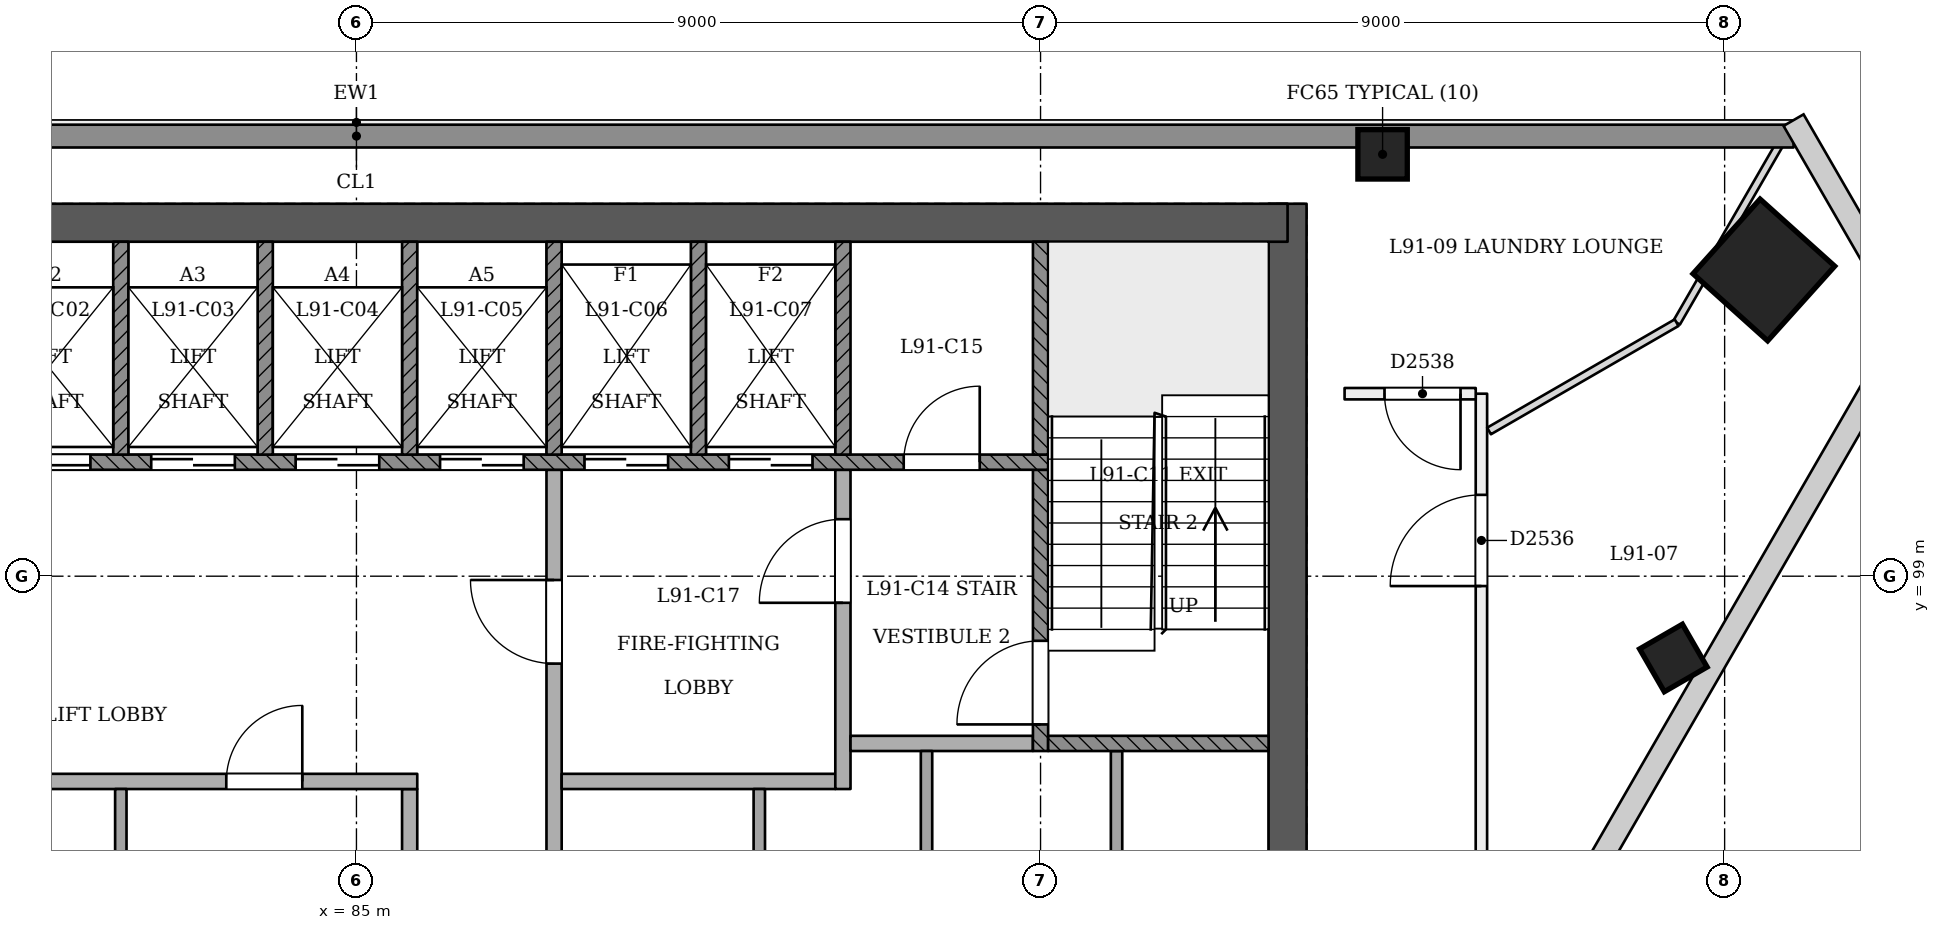
"""IFC4 building model, lengths in metres.
Left out: names, types, materials, properties, quantities, classifications, styles, units other than length and angle.
Written with IfcOpenShell. Run it as: python <this file> out.ifc"""

import sys

from ifc_helpers import new_model, si_unit, direction, frame, frame_2d, origin, origin_2d, place, context, subcontext, project, spatial, rectangle, extrude, element, fill, save


model = new_model("IFC4")
c1 = context("Model", 3, precision=1e-05, world=origin(), true_north=direction((0.0, 1.0)))
c2 = subcontext(c1, "Body", "Model", "MODEL_VIEW")
j1 = project(units=[si_unit("LENGTHUNIT", "METRE"), si_unit("PLANEANGLEUNIT", "RADIAN")], contexts=[c1])
p1 = place(None, origin())
s1 = spatial("IfcSite", under=j1, at=p1, CompositionType="ELEMENT")
p2 = place(p1, origin())
s2 = spatial("IfcBuilding", under=s1, at=p2, CompositionType="ELEMENT")
p3 = place(p2, frame((0.0, 0.0, 350.8)))
s3 = spatial("IfcBuildingStorey", under=s2, at=p3, CompositionType="ELEMENT", Elevation=350.8)
p4 = place(p3, frame((97.25, 93.15, 0.0), z_axis=(0.0, 0.0, 1.0), x_axis=(0.0, 1.0, 0.0)))
e1 = element("IfcWall", 1, at=p4, inside=s3, PredefinedType="SHEAR", context=c2, shape_type="SweptSolid", body=[
    extrude(rectangle(XDim=10.75, YDim=0.5, at=frame_2d((5.375, 0.0))), origin(), (0.0, 0.0, 1.0), 3.6),
])
p5 = place(p3, frame((97.25, 103.65, 0.0), z_axis=(0.0, 0.0, 1.0), x_axis=(-1.0, 0.0, 0.0)))
e2 = element("IfcWall", 2, at=p5, inside=s3, PredefinedType="SHEAR", context=c2, shape_type="SweptSolid", body=[
    extrude(rectangle(XDim=24.75, YDim=0.5, at=frame_2d((12.375, 0.0))), origin(), (0.0, 0.0, 1.0), 3.6),
])
p6 = place(p3, frame((103.55, 103.018, 0.0), z_axis=(-0.028403721265, 0.009287135593, 0.999553389135), x_axis=(0.498891314878, -0.866379500861, 0.022226480336)))
e3 = element("IfcColumn", 3, at=p6, inside=s3, PredefinedType="COLUMN", context=c2, shape_type="SweptSolid", body=[
    extrude(rectangle(XDim=1.32, YDim=1.32, at=origin_2d()), origin(), (0.0, 0.0, 1.0), 3.602),
])
p7 = place(p3, frame((98.5, 104.55, 0.0), z_axis=(0.0, 0.0, 1.0), x_axis=(1.0, 0.0, 0.0)))
e4 = element("IfcColumn", 4, at=p7, inside=s3, PredefinedType="COLUMN", context=c2, shape_type="SweptSolid", body=[
    extrude(rectangle(XDim=0.65, YDim=0.65, at=origin_2d()), origin(), (0.0, 0.0, 1.0), 3.6),
])
p8 = place(p3, frame((102.353, 97.877, -0.02), z_axis=(-0.022153634206, 0.038480930364, 0.999013730882), x_axis=(-0.501312914587, -0.864981193481, 0.022201274571)))
e5 = element("IfcColumn", 5, at=p8, inside=s3, PredefinedType="COLUMN", context=c2, shape_type="SweptSolid", body=[
    extrude(rectangle(XDim=0.65, YDim=0.65, at=origin_2d()), origin(), (0.0, 0.0, 1.0), 3.604),
])
p9 = place(p3, frame((99.8, 92.685, 0.0), z_axis=(0.0, 0.0, 1.0), x_axis=(2.8011989e-05, 0.999999999608, 0.0)))
e6 = element("IfcWall", 6, at=p9, inside=s3, PredefinedType="PARTITIONING", context=c2, shape_type="SweptSolid", body=[
    extrude(rectangle(XDim=8.716, YDim=0.15, at=frame_2d((4.358, 0.0))), origin(), (0.0, 0.0, 1.0), 2.7),
])
p10 = place(p9, frame((6.185, 0.0, 0.0)))
e7 = element("IfcOpeningElement", 7, at=p10, cuts=e6, PredefinedType="OPENING", context=c2, shape_type="SweptSolid", body=[
    extrude(rectangle(XDim=1.2, YDim=2.1, at=frame_2d((0.6, 1.05))), frame((0.0, 0.085, 0.0), z_axis=(0.0, -1.0, 0.0), x_axis=(1.0, 0.0, 0.0)), (0.0, 0.0, 1.0), 0.171),
])
p11 = place(p3, frame((99.725, 101.401, 0.0), z_axis=(0.0, 0.0, 1.0), x_axis=(-1.0, 0.0, 0.0)))
e8 = element("IfcWall", 8, at=p11, inside=s3, PredefinedType="PARTITIONING", context=c2, shape_type="SweptSolid", body=[
    extrude(rectangle(XDim=1.725, YDim=0.15, at=frame_2d((0.863, 0.0))), origin(), (0.0, 0.0, 1.0), 3.2),
])
p12 = place(p11, frame((0.2, 0.0, 0.0)))
e9 = element("IfcOpeningElement", 9, at=p12, cuts=e8, PredefinedType="OPENING", context=c2, shape_type="SweptSolid", body=[
    extrude(rectangle(XDim=1.0, YDim=2.1, at=frame_2d((0.5, 1.05))), frame((0.0, 0.085, 0.0), z_axis=(0.0, -1.0, 0.0), x_axis=(1.0, 0.0, 0.0)), (0.0, 0.0, 1.0), 0.171),
])
p13 = place(p3, frame((103.849, 104.9, 0.0), z_axis=(0.0, 0.0, 1.0), x_axis=(-0.499996007168, -0.866027709035, 0.0)))
e10 = element("IfcWall", 10, at=p13, inside=s3, PredefinedType="PARTITIONING", context=c2, shape_type="SweptSolid", body=[
    extrude(rectangle(XDim=2.961, YDim=0.1, at=frame_2d((1.481, 0.0))), origin(), (0.0, 0.0, 1.0), 2.7),
])
p14 = place(p3, frame((102.368, 102.335, 0.0), z_axis=(0.0, 0.0, 1.0), x_axis=(-0.866041498374, -0.499972122318, 0.0)))
e11 = element("IfcWall", 11, at=p14, inside=s3, PredefinedType="PARTITIONING", context=c2, shape_type="SweptSolid", body=[
    extrude(rectangle(XDim=2.85, YDim=0.1, at=frame_2d((1.425, 0.0))), origin(), (0.0, 0.0, 1.0), 3.2),
])
p15 = place(p3, frame((66.093, 104.79, 0.0), z_axis=(0.0, 0.0, 1.0), x_axis=(1.0, 0.0, 0.0)))
e12 = element("IfcWall", 12, at=p15, inside=s3, PredefinedType="SOLIDWALL", context=c2, shape_type="SweptSolid", body=[
    extrude(rectangle(XDim=37.813, YDim=0.3, at=frame_2d((18.907, 0.0))), origin(), (0.0, 0.0, 1.0), 2.7),
])
p16 = place(p3, frame((81.9, 93.4, 0.0), z_axis=(0.0, 0.0, 1.0), x_axis=(0.0, 1.0, 0.0)))
e13 = element("IfcWall", 13, at=p16, inside=s3, PredefinedType="PARTITIONING", context=c2, shape_type="SweptSolid", body=[
    extrude(rectangle(XDim=2.8, YDim=0.15, at=frame_2d((1.4, 0.0))), origin(), (0.0, 0.0, 1.0), 3.2),
])
p17 = place(p3, frame((85.7, 93.4, 0.0), z_axis=(0.0, 0.0, 1.0), x_axis=(0.0, 1.0, 0.0)))
e14 = element("IfcWall", 14, at=p17, inside=s3, PredefinedType="PARTITIONING", context=c2, shape_type="SweptSolid", body=[
    extrude(rectangle(XDim=2.8, YDim=0.2, at=frame_2d((1.4, 0.0))), origin(), (0.0, 0.0, 1.0), 3.2),
])
p18 = place(p3, frame((87.6, 93.4, 0.0), z_axis=(0.0, 0.0, 1.0), x_axis=(0.0, 1.0, 0.0)))
e15 = element("IfcWall", 15, at=p18, inside=s3, PredefinedType="PARTITIONING", context=c2, shape_type="SweptSolid", body=[
    extrude(rectangle(XDim=7.0, YDim=0.2, at=frame_2d((3.5, 0.0))), origin(), (0.0, 0.0, 1.0), 3.2),
])
p19 = place(p18, frame((4.45, 0.0, 0.0)))
e16 = element("IfcOpeningElement", 16, at=p19, cuts=e15, PredefinedType="OPENING", context=c2, shape_type="SweptSolid", body=[
    extrude(rectangle(XDim=1.1, YDim=2.1, at=frame_2d((0.55, 1.05))), frame((0.0, 0.11, 0.0), z_axis=(0.0, -1.0, 0.0), x_axis=(1.0, 0.0, 0.0)), (0.0, 0.0, 1.0), 0.221),
])
p20 = place(p3, frame((90.3, 93.4, 0.0), z_axis=(0.0, 0.0, 1.0), x_axis=(0.0, 1.0, 0.0)))
e17 = element("IfcWall", 17, at=p20, inside=s3, PredefinedType="PARTITIONING", context=c2, shape_type="SweptSolid", body=[
    extrude(rectangle(XDim=2.8, YDim=0.15, at=frame_2d((1.4, 0.0))), origin(), (0.0, 0.0, 1.0), 3.2),
])
for number, where, z_axis, x_axis in (
    (18, (92.5, 93.4, 0.0), (0.0, 0.0, 1.0), (0.0, 1.0, 0.0)),
    (19, (95.0, 93.4, 0.0), (0.0, 0.0, 1.0), (0.0, 1.0, 0.0)),
):
    element("IfcWall", number, at=place(p3, frame(where, z_axis=z_axis, x_axis=x_axis)), inside=s3, PredefinedType="PARTITIONING", context=c2, shape_type="SweptSolid", body=[
        extrude(rectangle(XDim=3.3, YDim=0.15, at=frame_2d((1.65, 0.0))), origin(), (0.0, 0.0, 1.0), 3.2),
    ])
p21 = place(p3, frame((78.0, 96.3, 0.0), z_axis=(0.0, 0.0, 1.0), x_axis=(1.0, 0.0, 0.0)))
e20 = element("IfcWall", 20, at=p21, inside=s3, PredefinedType="PARTITIONING", context=c2, shape_type="SweptSolid", body=[
    extrude(rectangle(XDim=7.8, YDim=0.2, at=frame_2d((3.9, 0.0))), origin(), (0.0, 0.0, 1.0), 3.2),
])
p22 = place(p21, frame((1.512, 0.0, 0.0)))
e21 = element("IfcOpeningElement", 21, at=p22, cuts=e20, PredefinedType="OPENING", context=c2, shape_type="SweptSolid", body=[
    extrude(rectangle(XDim=1.0, YDim=2.1, at=frame_2d((0.5, 1.05))), frame((0.0, 0.11, 0.0), z_axis=(0.0, -1.0, 0.0), x_axis=(1.0, 0.0, 0.0)), (0.0, 0.0, 1.0), 0.221),
])
p23 = place(p21, frame((5.288, 0.0, 0.0)))
e22 = element("IfcOpeningElement", 22, at=p23, cuts=e20, PredefinedType="OPENING", context=c2, shape_type="SweptSolid", body=[
    extrude(rectangle(XDim=1.0, YDim=2.1, at=frame_2d((0.5, 1.05))), frame((0.0, 0.11, 0.0), z_axis=(0.0, -1.0, 0.0), x_axis=(1.0, 0.0, 0.0)), (0.0, 0.0, 1.0), 0.221),
])
p24 = place(p3, frame((87.7, 96.3, 0.0), z_axis=(0.0, 0.0, 1.0), x_axis=(1.0, 0.0, 0.0)))
e23 = element("IfcWall", 23, at=p24, inside=s3, PredefinedType="PARTITIONING", context=c2, shape_type="SweptSolid", body=[
    extrude(rectangle(XDim=3.6, YDim=0.2, at=frame_2d((1.8, 0.0))), origin(), (0.0, 0.0, 1.0), 3.2),
])
p25 = place(p3, frame((91.4, 96.2, 0.0), z_axis=(0.0, 0.0, 1.0), x_axis=(0.0, 1.0, 0.0)))
e24 = element("IfcWall", 24, at=p25, inside=s3, PredefinedType="PARTITIONING", context=c2, shape_type="SweptSolid", body=[
    extrude(rectangle(XDim=4.2, YDim=0.2, at=frame_2d((2.1, 0.0))), origin(), (0.0, 0.0, 1.0), 3.2),
])
p26 = place(p25, frame((2.45, 0.0, 0.0)))
e25 = element("IfcOpeningElement", 25, at=p26, cuts=e24, PredefinedType="OPENING", context=c2, shape_type="SweptSolid", body=[
    extrude(rectangle(XDim=1.1, YDim=2.1, at=frame_2d((0.55, 1.05))), frame((0.0, 0.11, 0.0), z_axis=(0.0, -1.0, 0.0), x_axis=(1.0, 0.0, 0.0)), (0.0, 0.0, 1.0), 0.221),
])
p27 = place(p3, frame((91.5, 96.8, 0.0), z_axis=(0.0, 0.0, 1.0), x_axis=(1.0, 0.0, 0.0)))
e26 = element("IfcWall", 26, at=p27, inside=s3, PredefinedType="PARTITIONING", context=c2, shape_type="SweptSolid", body=[
    extrude(rectangle(XDim=2.4, YDim=0.2, at=frame_2d((1.2, 0.0))), origin(), (0.0, 0.0, 1.0), 3.2),
])
p28 = place(p3, frame((94.0, 96.7, 0.0), z_axis=(0.0, 0.0, 1.0), x_axis=(0.0, 1.0, 0.0)))
e27 = element("IfcWall", 27, at=p28, inside=s3, PredefinedType="SOLIDWALL", context=c2, shape_type="SweptSolid", body=[
    extrude(rectangle(XDim=3.7, YDim=0.2, at=frame_2d((1.85, 0.0))), origin(), (0.0, 0.0, 1.0), 3.2),
])
p29 = place(p28, frame((0.35, 0.0, 0.0)))
e28 = element("IfcOpeningElement", 28, at=p29, cuts=e27, PredefinedType="OPENING", context=c2, shape_type="SweptSolid", body=[
    extrude(rectangle(XDim=1.1, YDim=2.1, at=frame_2d((0.55, 1.05))), frame((0.0, 0.11, 0.0), z_axis=(0.0, -1.0, 0.0), x_axis=(1.0, 0.0, 0.0)), (0.0, 0.0, 1.0), 0.221),
])
p30 = place(p3, frame((94.1, 96.8, 0.0), z_axis=(0.0, 0.0, 1.0), x_axis=(1.0, 0.0, 0.0)))
e29 = element("IfcWall", 29, at=p30, inside=s3, PredefinedType="SOLIDWALL", context=c2, shape_type="SweptSolid", body=[
    extrude(rectangle(XDim=2.9, YDim=0.2, at=frame_2d((1.45, 0.0))), origin(), (0.0, 0.0, 1.0), 3.2),
])
p31 = place(p3, frame((75.9, 100.5, 0.0), z_axis=(0.0, 0.0, 1.0), x_axis=(1.0, 0.0, 0.0)))
e30 = element("IfcWall", 30, at=p31, inside=s3, PredefinedType="SOLIDWALL", context=c2, shape_type="SweptSolid", body=[
    extrude(rectangle(XDim=18.2, YDim=0.2, at=frame_2d((9.1, 0.0))), origin(), (0.0, 0.0, 1.0), 3.2),
])
p32 = place(p31, frame((2.6, 0.0, 0.0)))
e31 = element("IfcOpeningElement", 31, at=p32, cuts=e30, PredefinedType="OPENING", context=c2, shape_type="SweptSolid", body=[
    extrude(rectangle(XDim=1.1, YDim=2.1, at=frame_2d((0.55, 1.05))), frame((0.0, 0.11, 0.0), z_axis=(0.0, -1.0, 0.0), x_axis=(1.0, 0.0, 0.0)), (0.0, 0.0, 1.0), 0.221),
])
p33 = place(p31, frame((4.5, 0.0, 0.0)))
e32 = element("IfcOpeningElement", 32, at=p33, cuts=e30, PredefinedType="OPENING", context=c2, shape_type="SweptSolid", body=[
    extrude(rectangle(XDim=1.1, YDim=2.1, at=frame_2d((0.55, 1.05))), frame((0.0, 0.11, 0.0), z_axis=(0.0, -1.0, 0.0), x_axis=(1.0, 0.0, 0.0)), (0.0, 0.0, 1.0), 0.221),
])
p34 = place(p31, frame((6.4, 0.0, 0.0)))
e33 = element("IfcOpeningElement", 33, at=p34, cuts=e30, PredefinedType="OPENING", context=c2, shape_type="SweptSolid", body=[
    extrude(rectangle(XDim=1.1, YDim=2.1, at=frame_2d((0.55, 1.05))), frame((0.0, 0.11, 0.0), z_axis=(0.0, -1.0, 0.0), x_axis=(1.0, 0.0, 0.0)), (0.0, 0.0, 1.0), 0.221),
])
p35 = place(p31, frame((8.3, 0.0, 0.0)))
e34 = element("IfcOpeningElement", 34, at=p35, cuts=e30, PredefinedType="OPENING", context=c2, shape_type="SweptSolid", body=[
    extrude(rectangle(XDim=1.1, YDim=2.1, at=frame_2d((0.55, 1.05))), frame((0.0, 0.11, 0.0), z_axis=(0.0, -1.0, 0.0), x_axis=(1.0, 0.0, 0.0)), (0.0, 0.0, 1.0), 0.221),
])
p36 = place(p31, frame((10.2, 0.0, 0.0)))
e35 = element("IfcOpeningElement", 35, at=p36, cuts=e30, PredefinedType="OPENING", context=c2, shape_type="SweptSolid", body=[
    extrude(rectangle(XDim=1.1, YDim=2.1, at=frame_2d((0.55, 1.05))), frame((0.0, 0.11, 0.0), z_axis=(0.0, -1.0, 0.0), x_axis=(1.0, 0.0, 0.0)), (0.0, 0.0, 1.0), 0.221),
])
p37 = place(p31, frame((12.1, 0.0, 0.0)))
e36 = element("IfcOpeningElement", 36, at=p37, cuts=e30, PredefinedType="OPENING", context=c2, shape_type="SweptSolid", body=[
    extrude(rectangle(XDim=1.1, YDim=2.1, at=frame_2d((0.55, 1.05))), frame((0.0, 0.11, 0.0), z_axis=(0.0, -1.0, 0.0), x_axis=(1.0, 0.0, 0.0)), (0.0, 0.0, 1.0), 0.221),
])
p38 = place(p31, frame((14.0, 0.0, 0.0)))
e37 = element("IfcOpeningElement", 37, at=p38, cuts=e30, PredefinedType="OPENING", context=c2, shape_type="SweptSolid", body=[
    extrude(rectangle(XDim=1.1, YDim=2.1, at=frame_2d((0.55, 1.05))), frame((0.0, 0.11, 0.0), z_axis=(0.0, -1.0, 0.0), x_axis=(1.0, 0.0, 0.0)), (0.0, 0.0, 1.0), 0.221),
])
p39 = place(p31, frame((0.65, 0.0, 0.0)))
e38 = element("IfcOpeningElement", 38, at=p39, cuts=e30, PredefinedType="OPENING", context=c2, shape_type="SweptSolid", body=[
    extrude(rectangle(XDim=1.0, YDim=2.1, at=frame_2d((0.5, 1.05))), frame((0.0, 0.11, 0.0), z_axis=(0.0, -1.0, 0.0), x_axis=(1.0, 0.0, 0.0)), (0.0, 0.0, 1.0), 0.221),
])
p40 = place(p31, frame((16.3, 0.0, 0.0)))
e39 = element("IfcOpeningElement", 39, at=p40, cuts=e30, PredefinedType="OPENING", context=c2, shape_type="SweptSolid", body=[
    extrude(rectangle(XDim=1.0, YDim=2.1, at=frame_2d((0.5, 1.05))), frame((0.0, 0.11, 0.0), z_axis=(0.0, -1.0, 0.0), x_axis=(1.0, 0.0, 0.0)), (0.0, 0.0, 1.0), 0.221),
])
for number, where, z_axis, x_axis in (
    (40, (81.9, 100.6, 0.0), (0.0, 0.0, 1.0), (0.0, 1.0, 0.0)),
    (41, (83.8, 100.6, 0.0), (0.0, 0.0, 1.0), (0.0, 1.0, 0.0)),
    (42, (85.7, 100.6, 0.0), (0.0, 0.0, 1.0), (0.0, 1.0, 0.0)),
    (43, (87.6, 100.6, 0.0), (0.0, 0.0, 1.0), (0.0, 1.0, 0.0)),
    (44, (89.5, 100.6, 0.0), (0.0, 0.0, 1.0), (0.0, 1.0, 0.0)),
    (45, (91.4, 100.6, 0.0), (0.0, 0.0, 1.0), (0.0, 1.0, 0.0)),
    (46, (94.0, 100.6, 0.0), (0.0, 0.0, 1.0), (0.0, 1.0, 0.0)),
):
    element("IfcWall", number, at=place(p3, frame(where, z_axis=z_axis, x_axis=x_axis)), inside=s3, PredefinedType="SOLIDWALL", context=c2, shape_type="SweptSolid", body=[
        extrude(rectangle(XDim=2.8, YDim=0.2, at=frame_2d((1.4, 0.0))), origin(), (0.0, 0.0, 1.0), 3.2),
    ])
p41 = place(p10, origin())
e47 = element("IfcDoor", 47, at=p41, inside=s3, OperationType="SINGLE_SWING_LEFT", PredefinedType="NOTDEFINED", context=c2, shape_type="SweptSolid", body=[
    extrude(rectangle(XDim=1.2, YDim=2.1, at=frame_2d((0.6, 1.05))), frame((0.0, 0.025, 0.0), z_axis=(0.0, -1.0, 0.0), x_axis=(1.0, 0.0, 0.0)), (0.0, 0.0, 1.0), 0.05),
])
fill(e7, e47)
p42 = place(p12, origin())
e48 = element("IfcDoor", 48, at=p42, inside=s3, OperationType="SINGLE_SWING_LEFT", PredefinedType="NOTDEFINED", context=c2, shape_type="SweptSolid", body=[
    extrude(rectangle(XDim=1.0, YDim=2.1, at=frame_2d((0.5, 1.05))), frame((0.0, 0.025, 0.0), z_axis=(0.0, -1.0, 0.0), x_axis=(1.0, 0.0, 0.0)), (0.0, 0.0, 1.0), 0.05),
])
fill(e9, e48)
p43 = place(p33, origin())
e49 = element("IfcDoor", 49, at=p43, inside=s3, OperationType="SLIDING_TO_LEFT", PredefinedType="NOTDEFINED", context=c2, shape_type="SweptSolid", body=[
    extrude(rectangle(XDim=1.1, YDim=2.1, at=frame_2d((0.55, 1.05))), frame((0.0, 0.025, 0.0), z_axis=(0.0, -1.0, 0.0), x_axis=(1.0, 0.0, 0.0)), (0.0, 0.0, 1.0), 0.05),
])
fill(e32, e49)
p44 = place(p34, origin())
e50 = element("IfcDoor", 50, at=p44, inside=s3, OperationType="SLIDING_TO_RIGHT", PredefinedType="NOTDEFINED", context=c2, shape_type="SweptSolid", body=[
    extrude(rectangle(XDim=1.1, YDim=2.1, at=frame_2d((0.55, 1.05))), frame((0.0, 0.025, 0.0), z_axis=(0.0, -1.0, 0.0), x_axis=(1.0, 0.0, 0.0)), (0.0, 0.0, 1.0), 0.05),
])
fill(e33, e50)
p45 = place(p35, origin())
e51 = element("IfcDoor", 51, at=p45, inside=s3, OperationType="SLIDING_TO_LEFT", PredefinedType="NOTDEFINED", context=c2, shape_type="SweptSolid", body=[
    extrude(rectangle(XDim=1.1, YDim=2.1, at=frame_2d((0.55, 1.05))), frame((0.0, 0.025, 0.0), z_axis=(0.0, -1.0, 0.0), x_axis=(1.0, 0.0, 0.0)), (0.0, 0.0, 1.0), 0.05),
])
fill(e34, e51)
p46 = place(p36, origin())
e52 = element("IfcDoor", 52, at=p46, inside=s3, OperationType="SLIDING_TO_RIGHT", PredefinedType="NOTDEFINED", context=c2, shape_type="SweptSolid", body=[
    extrude(rectangle(XDim=1.1, YDim=2.1, at=frame_2d((0.55, 1.05))), frame((0.0, 0.025, 0.0), z_axis=(0.0, -1.0, 0.0), x_axis=(1.0, 0.0, 0.0)), (0.0, 0.0, 1.0), 0.05),
])
fill(e35, e52)
p47 = place(p37, origin())
e53 = element("IfcDoor", 53, at=p47, inside=s3, OperationType="SLIDING_TO_RIGHT", PredefinedType="NOTDEFINED", context=c2, shape_type="SweptSolid", body=[
    extrude(rectangle(XDim=1.1, YDim=2.1, at=frame_2d((0.55, 1.05))), frame((0.0, 0.025, 0.0), z_axis=(0.0, -1.0, 0.0), x_axis=(1.0, 0.0, 0.0)), (0.0, 0.0, 1.0), 0.05),
])
fill(e36, e53)
p48 = place(p38, origin())
e54 = element("IfcDoor", 54, at=p48, inside=s3, OperationType="SLIDING_TO_LEFT", PredefinedType="NOTDEFINED", context=c2, shape_type="SweptSolid", body=[
    extrude(rectangle(XDim=1.1, YDim=2.1, at=frame_2d((0.55, 1.05))), frame((0.0, 0.025, 0.0), z_axis=(0.0, -1.0, 0.0), x_axis=(1.0, 0.0, 0.0)), (0.0, 0.0, 1.0), 0.05),
])
fill(e37, e54)
p49 = place(p29, origin())
e55 = element("IfcDoor", 55, at=p49, inside=s3, OperationType="SINGLE_SWING_LEFT", PredefinedType="NOTDEFINED", context=c2, shape_type="SweptSolid", body=[
    extrude(rectangle(XDim=1.1, YDim=2.1, at=frame_2d((0.55, 1.05))), frame((0.0, 0.025, 0.0), z_axis=(0.0, -1.0, 0.0), x_axis=(1.0, 0.0, 0.0)), (0.0, 0.0, 1.0), 0.05),
])
fill(e28, e55)
p50 = place(p19, origin())
e56 = element("IfcDoor", 56, at=p50, inside=s3, OperationType="SINGLE_SWING_RIGHT", PredefinedType="NOTDEFINED", context=c2, shape_type="SweptSolid", body=[
    extrude(rectangle(XDim=1.1, YDim=2.1, at=frame_2d((0.55, 1.05))), frame((0.0, 0.025, 0.0), z_axis=(0.0, -1.0, 0.0), x_axis=(1.0, 0.0, 0.0)), (0.0, 0.0, 1.0), 0.05),
])
fill(e16, e56)
p51 = place(p26, origin())
e57 = element("IfcDoor", 57, at=p51, inside=s3, OperationType="SINGLE_SWING_LEFT", PredefinedType="NOTDEFINED", context=c2, shape_type="SweptSolid", body=[
    extrude(rectangle(XDim=1.1, YDim=2.1, at=frame_2d((0.55, 1.05))), frame((0.0, 0.025, 0.0), z_axis=(0.0, -1.0, 0.0), x_axis=(1.0, 0.0, 0.0)), (0.0, 0.0, 1.0), 0.05),
])
fill(e25, e57)
p52 = place(p40, origin())
e58 = element("IfcDoor", 58, at=p52, inside=s3, OperationType="SINGLE_SWING_RIGHT", PredefinedType="NOTDEFINED", context=c2, shape_type="SweptSolid", body=[
    extrude(rectangle(XDim=1.0, YDim=2.1, at=frame_2d((0.5, 1.05))), frame((0.0, 0.025, 0.0), z_axis=(0.0, -1.0, 0.0), x_axis=(1.0, 0.0, 0.0)), (0.0, 0.0, 1.0), 0.05),
])
fill(e39, e58)
p53 = place(p23, origin())
e59 = element("IfcDoor", 59, at=p53, inside=s3, OperationType="SINGLE_SWING_RIGHT", PredefinedType="NOTDEFINED", context=c2, shape_type="SweptSolid", body=[
    extrude(rectangle(XDim=1.0, YDim=2.1, at=frame_2d((0.5, 1.05))), frame((0.0, 0.025, 0.0), z_axis=(0.0, -1.0, 0.0), x_axis=(1.0, 0.0, 0.0)), (0.0, 0.0, 1.0), 0.05),
])
fill(e22, e59)
save(model, sys.argv[1])
